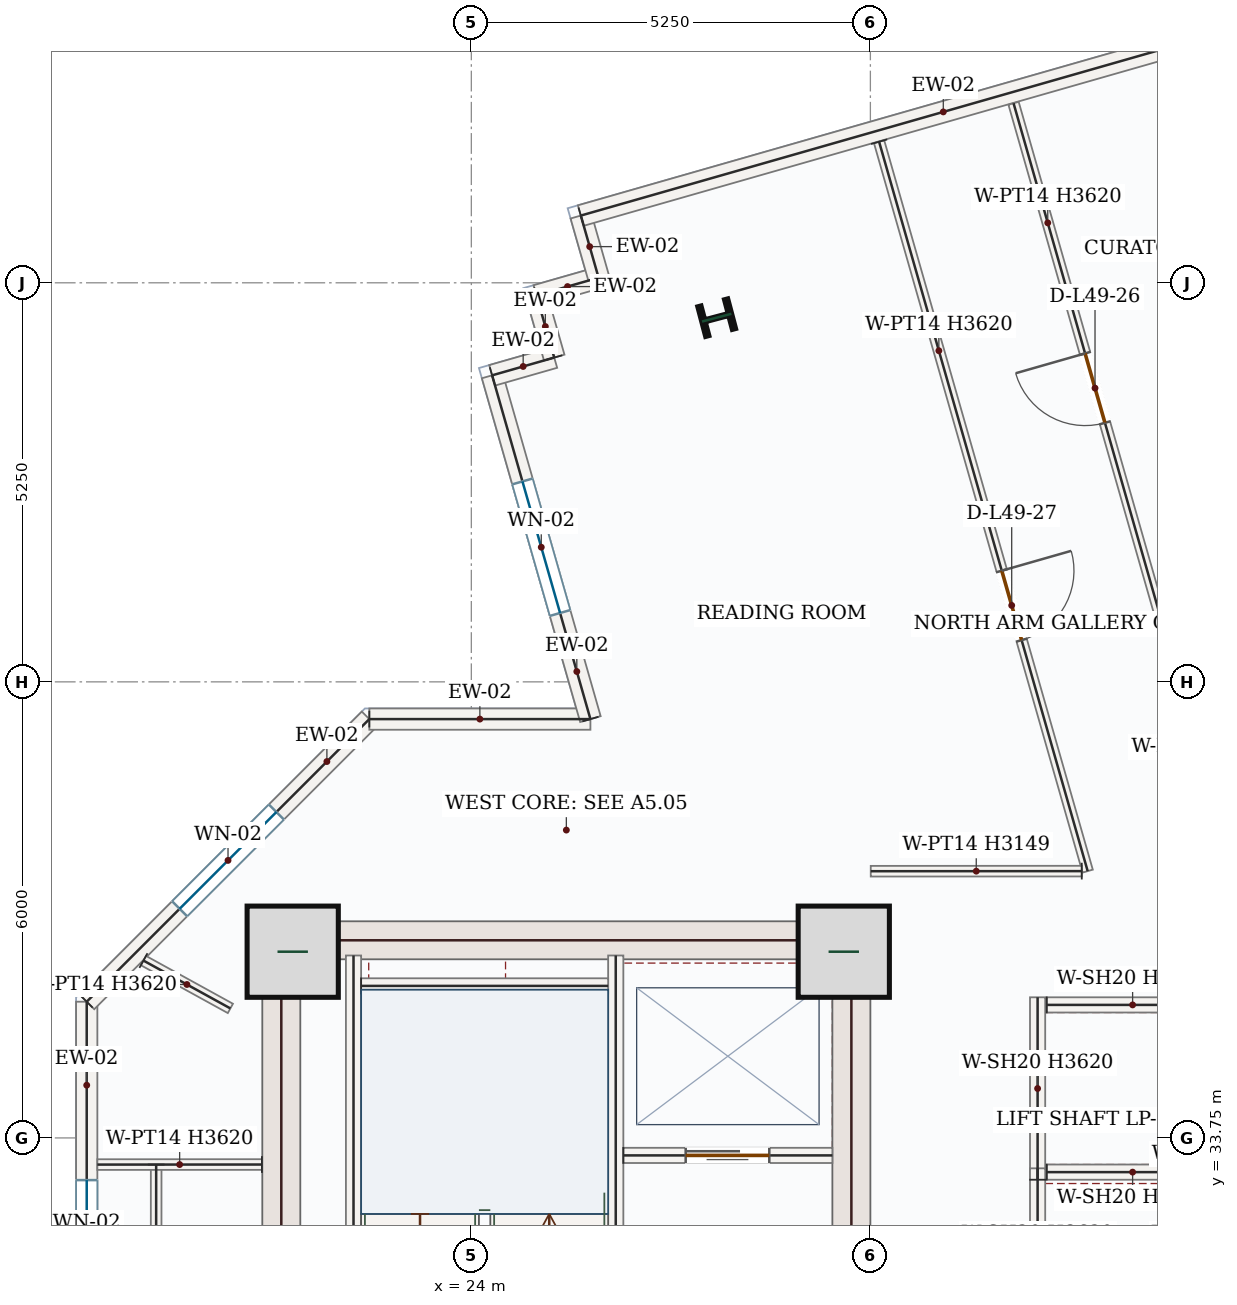
"""IFC4 building model, lengths in metres.
Left out: names, types, materials, properties, quantities, classifications, styles, units other than length and angle.
Written with IfcOpenShell. Run it as: python <this file> out.ifc"""

import sys

from ifc_helpers import new_model, si_unit, direction, frame, frame_2d, origin, origin_2d, place, context, subcontext, project, spatial, rectangle, i_section, extrude, source, transform, mapped, element, fill, save


model = new_model("IFC4")
c1 = context("Model", 3, precision=1e-05, world=origin(), true_north=direction((0.0, 1.0)))
c2 = subcontext(c1, "Body", "Model", "MODEL_VIEW")
j1 = project(units=[si_unit("LENGTHUNIT", "METRE"), si_unit("PLANEANGLEUNIT", "RADIAN")], contexts=[c1])
p1 = place(None, origin())
s1 = spatial("IfcSite", under=j1, at=p1, CompositionType="ELEMENT")
p2 = place(p1, origin())
s2 = spatial("IfcBuilding", under=s1, at=p2, CompositionType="ELEMENT")
p3 = place(p2, frame((0.0, 0.0, 209.7)))
s3 = spatial("IfcBuildingStorey", under=s2, at=p3, CompositionType="ELEMENT", Elevation=209.7)
m1 = source(origin(), c2, "Body", "SweptSolid", [
    extrude(rectangle(XDim=8.55, YDim=0.5, at=frame_2d((4.275, 0.0))), origin(), (0.0, 0.0, 1.0), 3.62),
])
p4 = place(p3, frame((21.5, 28.05, 0.0), z_axis=(0.0, 0.0, 1.0), x_axis=(0.0, 1.0, 0.0)))
e1 = element("IfcWall", 1, at=p4, inside=s3, PredefinedType="SHEAR", context=c2, shape_type="MappedRepresentation", body=[
    mapped(m1, transform((0.0, 0.0, 0.0), x_axis=(1.0, 0.0, 0.0), y_axis=(0.0, 1.0, 0.0), z_axis=(0.0, 0.0, 1.0), scale=1.0)),
])
p5 = place(p3, frame((29.0, 28.05, 0.0), z_axis=(0.0, 0.0, 1.0), x_axis=(0.0, 1.0, 0.0)))
e2 = element("IfcWall", 2, at=p5, inside=s3, PredefinedType="SHEAR", context=c2, shape_type="SweptSolid", body=[
    extrude(rectangle(XDim=8.55, YDim=0.5, at=frame_2d((4.275, 0.0))), origin(), (0.0, 0.0, 1.0), 3.62),
])
p6 = place(p5, frame((1.5, 0.0, 0.0)))
e3 = element("IfcOpeningElement", 3, at=p6, cuts=e2, PredefinedType="OPENING", context=c2, shape_type="SweptSolid", body=[
    extrude(rectangle(XDim=1.1, YDim=2.2, at=frame_2d((0.55, 1.1))), frame((0.0, 0.26, 0.0), z_axis=(0.0, -1.0, 0.0), x_axis=(1.0, 0.0, 0.0)), (0.0, 0.0, 1.0), 0.52),
])
m2 = source(origin(), c2, "Body", "SweptSolid", [
    extrude(rectangle(XDim=7.0, YDim=0.5, at=frame_2d((3.5, 0.0))), origin(), (0.0, 0.0, 1.0), 3.62),
])
p7 = place(p3, frame((21.75, 36.35, 0.0), z_axis=(0.0, 0.0, 1.0), x_axis=(1.0, 0.0, 0.0)))
e4 = element("IfcWall", 4, at=p7, inside=s3, PredefinedType="SHEAR", context=c2, shape_type="MappedRepresentation", body=[
    mapped(m2, transform((0.0, 0.0, 0.0), x_axis=(1.0, 0.0, 0.0), y_axis=(0.0, 1.0, 0.0), z_axis=(0.0, 0.0, 1.0), scale=1.0)),
])
m3 = source(origin(), c2, "Body", "SweptSolid", [
    extrude(rectangle(XDim=1.2, YDim=1.2, at=origin_2d()), origin(), (0.0, 0.0, 1.0), 3.9),
])
for number, where, z_axis, x_axis in (
    (5, (21.65, 36.2, 0.0), (0.0, 0.0, 1.0), (1.0, 0.0, 0.0)),
    (6, (28.9, 36.2, 0.0), (0.0, 0.0, 1.0), (1.0, 0.0, 0.0)),
):
    element("IfcColumn", number, at=place(p3, frame(where, z_axis=z_axis, x_axis=x_axis)), inside=s3, PredefinedType="COLUMN", context=c2, shape_type="MappedRepresentation", body=[
        mapped(m3, transform((0.0, 0.0, 0.0), x_axis=(1.0, 0.0, 0.0), y_axis=(0.0, 1.0, 0.0), z_axis=(0.0, 0.0, 1.0), scale=1.0)),
    ])
m4 = source(origin(), c2, "Body", "SweptSolid", [
    extrude(i_section(OverallWidth=0.404, OverallDepth=0.407, WebThickness=0.027, FlangeThickness=0.044, FilletRadius=0.018, at=origin_2d()), origin(), (0.0, 0.0, 1.0), 3.9),
])
p8 = place(p3, frame((27.228, 44.541, 0.0), z_axis=(0.0, 0.0, 1.0), x_axis=(-0.255445757936, 0.966823388604, 0.0)))
e7 = element("IfcColumn", 7, at=p8, inside=s3, PredefinedType="COLUMN", context=c2, shape_type="MappedRepresentation", body=[
    mapped(m4, transform((0.0, 0.0, 0.0), x_axis=(1.0, 0.0, 0.0), y_axis=(0.0, 1.0, 0.0), z_axis=(0.0, 0.0, 1.0), scale=1.0)),
])
p9 = place(p3, frame((18.94, 29.048, 0.0), z_axis=(0.0, 0.0, 1.0), x_axis=(0.0, 1.0, 0.0)))
e8 = element("IfcWall", 8, at=p9, inside=s3, PredefinedType="SOLIDWALL", context=c2, shape_type="SweptSolid", body=[
    extrude(rectangle(XDim=6.494, YDim=0.28, at=frame_2d((3.247, 0.0))), origin(), (0.0, 0.0, 1.0), 3.62),
])
p10 = place(p9, frame((2.347, 0.0, 0.85)))
e9 = element("IfcOpeningElement", 9, at=p10, cuts=e8, PredefinedType="OPENING", context=c2, shape_type="SweptSolid", body=[
    extrude(rectangle(XDim=1.8, YDim=1.75, at=frame_2d((0.9, 0.875))), frame((0.0, 0.15, 0.0), z_axis=(0.0, -1.0, 0.0), x_axis=(1.0, 0.0, 0.0)), (0.0, 0.0, 1.0), 0.3),
])
p11 = place(p3, frame((18.94, 35.542, 0.0), z_axis=(0.0, 0.0, 1.0), x_axis=(0.707106781187, 0.707106781187, 0.0)))
e10 = element("IfcWall", 10, at=p11, inside=s3, PredefinedType="SOLIDWALL", context=c2, shape_type="SweptSolid", body=[
    extrude(rectangle(XDim=5.258, YDim=0.28, at=frame_2d((2.629, 0.0))), origin(), (0.0, 0.0, 1.0), 3.62),
])
p12 = place(p11, frame((1.729, 0.0, 0.85)))
e11 = element("IfcOpeningElement", 11, at=p12, cuts=e10, PredefinedType="OPENING", context=c2, shape_type="SweptSolid", body=[
    extrude(rectangle(XDim=1.8, YDim=1.75, at=frame_2d((0.9, 0.875))), frame((0.0, 0.15, 0.0), z_axis=(0.0, -1.0, 0.0), x_axis=(1.0, 0.0, 0.0)), (0.0, 0.0, 1.0), 0.3),
])
m5 = source(origin(), c2, "Body", "SweptSolid", [
    extrude(rectangle(XDim=2.909, YDim=0.28, at=frame_2d((1.455, 0.0))), origin(), (0.0, 0.0, 1.0), 3.62),
])
p13 = place(p3, frame((22.658, 39.26, 0.0), z_axis=(0.0, 0.0, 1.0), x_axis=(1.0, 0.0, 0.0)))
e12 = element("IfcWall", 12, at=p13, inside=s3, PredefinedType="SOLIDWALL", context=c2, shape_type="MappedRepresentation", body=[
    mapped(m5, transform((0.0, 0.0, 0.0), x_axis=(1.0, 0.0, 0.0), y_axis=(0.0, 1.0, 0.0), z_axis=(0.0, 0.0, 1.0), scale=1.0)),
])
p14 = place(p3, frame((25.567, 39.26, 0.0), z_axis=(0.0, 0.0, 1.0), x_axis=(-0.274981611661, 0.961449485542, 0.0)))
e13 = element("IfcWall", 13, at=p14, inside=s3, PredefinedType="SOLIDWALL", context=c2, shape_type="SweptSolid", body=[
    extrude(rectangle(XDim=4.704, YDim=0.28, at=frame_2d((2.352, 0.0))), origin(), (0.0, 0.0, 1.0), 3.62),
])
p15 = place(p14, frame((1.452, 0.0, 0.85)))
e14 = element("IfcOpeningElement", 14, at=p15, cuts=e13, PredefinedType="OPENING", context=c2, shape_type="SweptSolid", body=[
    extrude(rectangle(XDim=1.8, YDim=1.75, at=frame_2d((0.9, 0.875))), frame((0.0, 0.15, 0.0), z_axis=(0.0, -1.0, 0.0), x_axis=(1.0, 0.0, 0.0)), (0.0, 0.0, 1.0), 0.3),
])
m6 = source(origin(), c2, "Body", "SweptSolid", [
    extrude(rectangle(XDim=0.85, YDim=0.28, at=frame_2d((0.425, 0.0))), origin(), (0.0, 0.0, 1.0), 3.62),
])
p16 = place(p3, frame((24.273, 43.782, 0.0), z_axis=(0.0, 0.0, 1.0), x_axis=(0.961469728335, 0.274910824624, 0.0)))
e15 = element("IfcWall", 15, at=p16, inside=s3, PredefinedType="SOLIDWALL", context=c2, shape_type="MappedRepresentation", body=[
    mapped(m6, transform((0.0, 0.0, 0.0), x_axis=(1.0, 0.0, 0.0), y_axis=(0.0, 1.0, 0.0), z_axis=(0.0, 0.0, 1.0), scale=1.0)),
])
m7 = source(origin(), c2, "Body", "SweptSolid", [
    extrude(rectangle(XDim=0.85, YDim=0.28, at=frame_2d((0.425, 0.0))), origin(), (0.0, 0.0, 1.0), 3.62),
])
p17 = place(p3, frame((25.091, 44.016, 0.0), z_axis=(0.0, 0.0, 1.0), x_axis=(-0.274834915789, 0.961491429532, 0.0)))
e16 = element("IfcWall", 16, at=p17, inside=s3, PredefinedType="SOLIDWALL", context=c2, shape_type="MappedRepresentation", body=[
    mapped(m7, transform((0.0, 0.0, 0.0), x_axis=(1.0, 0.0, 0.0), y_axis=(0.0, 1.0, 0.0), z_axis=(0.0, 0.0, 1.0), scale=1.0)),
])
p18 = place(p3, frame((24.857, 44.833, 0.0), z_axis=(0.0, 0.0, 1.0), x_axis=(0.961469728335, 0.274910824624, 0.0)))
e17 = element("IfcWall", 17, at=p18, inside=s3, PredefinedType="SOLIDWALL", context=c2, shape_type="MappedRepresentation", body=[
    mapped(m6, transform((0.0, 0.0, 0.0), x_axis=(1.0, 0.0, 0.0), y_axis=(0.0, 1.0, 0.0), z_axis=(0.0, 0.0, 1.0), scale=1.0)),
])
p19 = place(p3, frame((25.674, 45.067, 0.0), z_axis=(0.0, 0.0, 1.0), x_axis=(-0.274834915789, 0.961491429532, 0.0)))
e18 = element("IfcWall", 18, at=p19, inside=s3, PredefinedType="SOLIDWALL", context=c2, shape_type="MappedRepresentation", body=[
    mapped(m7, transform((0.0, 0.0, 0.0), x_axis=(1.0, 0.0, 0.0), y_axis=(0.0, 1.0, 0.0), z_axis=(0.0, 0.0, 1.0), scale=1.0)),
])
m8 = source(origin(), c2, "Body", "SweptSolid", [
    extrude(rectangle(XDim=9.92, YDim=0.28, at=frame_2d((4.96, 0.0))), origin(), (0.0, 0.0, 1.0), 3.62),
])
p20 = place(p3, frame((25.44, 45.885, 0.0), z_axis=(0.0, 0.0, 1.0), x_axis=(0.961457051276, 0.274955157346, 0.0)))
e19 = element("IfcWall", 19, at=p20, inside=s3, PredefinedType="SOLIDWALL", context=c2, shape_type="MappedRepresentation", body=[
    mapped(m8, transform((0.0, 0.0, 0.0), x_axis=(1.0, 0.0, 0.0), y_axis=(0.0, 1.0, 0.0), z_axis=(0.0, 0.0, 1.0), scale=1.0)),
])
m9 = source(origin(), c2, "Body", "SweptSolid", [
    extrude(rectangle(XDim=7.87, YDim=0.2, at=frame_2d((3.935, 0.0))), origin(), (0.0, 0.0, 1.0), 3.62),
])
p21 = place(p3, frame((22.45, 28.28, 0.0), z_axis=(0.0, 0.0, 1.0), x_axis=(0.0, 1.0, 0.0)))
e20 = element("IfcWall", 20, at=p21, inside=s3, PredefinedType="SOLIDWALL", context=c2, shape_type="MappedRepresentation", body=[
    mapped(m9, transform((0.0, 0.0, 0.0), x_axis=(1.0, 0.0, 0.0), y_axis=(0.0, 1.0, 0.0), z_axis=(0.0, 0.0, 1.0), scale=1.0)),
])
p22 = place(p3, frame((25.9, 28.15, 0.0), z_axis=(0.0, 0.0, 1.0), x_axis=(0.0, 1.0, 0.0)))
e21 = element("IfcWall", 21, at=p22, inside=s3, PredefinedType="SOLIDWALL", context=c2, shape_type="SweptSolid", body=[
    extrude(rectangle(XDim=8.0, YDim=0.2, at=frame_2d((4.0, 0.0))), origin(), (0.0, 0.0, 1.0), 3.62),
])
p23 = place(p22, frame((0.4, 0.0, 0.0)))
e22 = element("IfcOpeningElement", 22, at=p23, cuts=e21, PredefinedType="OPENING", context=c2, shape_type="SweptSolid", body=[
    extrude(rectangle(XDim=1.05, YDim=2.15, at=frame_2d((0.525, 1.075))), frame((0.0, 0.11, 0.0), z_axis=(0.0, -1.0, 0.0), x_axis=(1.0, 0.0, 0.0)), (0.0, 0.0, 1.0), 0.22),
])
m10 = source(origin(), c2, "Body", "SweptSolid", [
    extrude(rectangle(XDim=3.25, YDim=0.2, at=frame_2d((1.625, 0.0))), origin(), (0.0, 0.0, 1.0), 3.62),
])
p24 = place(p3, frame((22.55, 35.75, 0.0), z_axis=(0.0, 0.0, 1.0), x_axis=(1.0, 0.0, 0.0)))
e23 = element("IfcWall", 23, at=p24, inside=s3, PredefinedType="SOLIDWALL", context=c2, shape_type="MappedRepresentation", body=[
    mapped(m10, transform((0.0, 0.0, 0.0), x_axis=(1.0, 0.0, 0.0), y_axis=(0.0, 1.0, 0.0), z_axis=(0.0, 0.0, 1.0), scale=1.0)),
])
p25 = place(p3, frame((26.0, 33.52, 0.0), z_axis=(0.0, 0.0, 1.0), x_axis=(1.0, 0.0, 0.0)))
e24 = element("IfcWall", 24, at=p25, inside=s3, PredefinedType="SOLIDWALL", context=c2, shape_type="SweptSolid", body=[
    extrude(rectangle(XDim=2.75, YDim=0.2, at=frame_2d((1.375, 0.0))), origin(), (0.0, 0.0, 1.0), 3.62),
])
p26 = place(p25, frame((0.82, 0.0, 0.0)))
e25 = element("IfcOpeningElement", 25, at=p26, cuts=e24, PredefinedType="OPENING", context=c2, shape_type="SweptSolid", body=[
    extrude(rectangle(XDim=1.1, YDim=2.15, at=frame_2d((0.55, 1.075))), frame((0.0, 0.11, 0.0), z_axis=(0.0, -1.0, 0.0), x_axis=(1.0, 0.0, 0.0)), (0.0, 0.0, 1.0), 0.22),
])
m11 = source(origin(), c2, "Body", "SweptSolid", [
    extrude(rectangle(XDim=2.4, YDim=0.2, at=frame_2d((1.2, 0.0))), origin(), (0.0, 0.0, 1.0), 3.62),
])
p27 = place(p3, frame((31.45, 33.2, 0.0), z_axis=(0.0, 0.0, 1.0), x_axis=(0.0, 1.0, 0.0)))
e26 = element("IfcWall", 26, at=p27, inside=s3, PredefinedType="SOLIDWALL", context=c2, shape_type="MappedRepresentation", body=[
    mapped(m11, transform((0.0, 0.0, 0.0), x_axis=(1.0, 0.0, 0.0), y_axis=(0.0, 1.0, 0.0), z_axis=(0.0, 0.0, 1.0), scale=1.0)),
])
m12 = source(origin(), c2, "Body", "SweptSolid", [
    extrude(rectangle(XDim=2.26, YDim=0.2, at=frame_2d((1.13, 0.0))), origin(), (0.0, 0.0, 1.0), 3.62),
])
for number, where, z_axis, x_axis in (
    (27, (31.57, 33.3, 0.0), (0.0, 0.0, 1.0), (1.0, 0.0, 0.0)),
    (28, (31.57, 35.5, 0.0), (0.0, 0.0, 1.0), (1.0, 0.0, 0.0)),
):
    element("IfcWall", number, at=place(p3, frame(where, z_axis=z_axis, x_axis=x_axis)), inside=s3, PredefinedType="SOLIDWALL", context=c2, shape_type="MappedRepresentation", body=[
        mapped(m12, transform((0.0, 0.0, 0.0), x_axis=(1.0, 0.0, 0.0), y_axis=(0.0, 1.0, 0.0), z_axis=(0.0, 0.0, 1.0), scale=1.0)),
    ])
p28 = place(p3, frame((31.45, 30.95, 0.0), z_axis=(0.0, 0.0, 1.0), x_axis=(0.0, 1.0, 0.0)))
e29 = element("IfcWall", 29, at=p28, inside=s3, PredefinedType="SOLIDWALL", context=c2, shape_type="MappedRepresentation", body=[
    mapped(m11, transform((0.0, 0.0, 0.0), x_axis=(1.0, 0.0, 0.0), y_axis=(0.0, 1.0, 0.0), z_axis=(0.0, 0.0, 1.0), scale=1.0)),
])
p29 = place(p3, frame((33.277, 39.867, 0.0), z_axis=(0.0, 0.0, 1.0), x_axis=(-0.274985856522, 0.96144827147, 0.0)))
e30 = element("IfcWall", 30, at=p29, inside=s3, PredefinedType="PARTITIONING", context=c2, shape_type="SweptSolid", body=[
    extrude(rectangle(XDim=7.795, YDim=0.14, at=frame_2d((3.897, 0.0))), origin(), (0.0, 0.0, 1.0), 3.62),
])
p30 = place(p29, frame((3.423, 0.0, 0.0)))
e31 = element("IfcOpeningElement", 31, at=p30, cuts=e30, PredefinedType="OPENING", context=c2, shape_type="SweptSolid", body=[
    extrude(rectangle(XDim=0.95, YDim=2.15, at=frame_2d((0.475, 1.075))), frame((0.0, 0.08, 0.0), z_axis=(0.0, -1.0, 0.0), x_axis=(1.0, 0.0, 0.0)), (0.0, 0.0, 1.0), 0.16),
])
m13 = source(origin(), c2, "Body", "SweptSolid", [
    extrude(rectangle(XDim=10.061, YDim=0.14, at=frame_2d((5.031, 0.0))), origin(), (0.0, 0.0, 1.0), 2.766),
])
p31 = place(p3, frame((19.854, 33.399, 0.0), z_axis=(0.0, 0.0, 1.0), x_axis=(-0.000363980467, -0.999999933759, 0.0)))
e32 = element("IfcWall", 32, at=p31, inside=s3, PredefinedType="PARTITIONING", context=c2, shape_type="MappedRepresentation", body=[
    mapped(m13, transform((0.0, 0.0, 0.0), x_axis=(1.0, 0.0, 0.0), y_axis=(0.0, 1.0, 0.0), z_axis=(0.0, 0.0, 1.0), scale=1.0)),
])
m14 = source(origin(), c2, "Body", "SweptSolid", [
    extrude(rectangle(XDim=1.305, YDim=0.14, at=frame_2d((0.653, 0.0))), origin(), (0.0, 0.0, 1.0), 3.62),
])
p32 = place(p3, frame((19.686, 36.083, 0.0), z_axis=(0.0, 0.0, 1.0), x_axis=(0.876117183384, -0.48209820678, 0.0)))
e33 = element("IfcWall", 33, at=p32, inside=s3, PredefinedType="PARTITIONING", context=c2, shape_type="MappedRepresentation", body=[
    mapped(m14, transform((0.0, 0.0, 0.0), x_axis=(1.0, 0.0, 0.0), y_axis=(0.0, 1.0, 0.0), z_axis=(0.0, 0.0, 1.0), scale=1.0)),
])
m15 = source(origin(), c2, "Body", "SweptSolid", [
    extrude(rectangle(XDim=2.165, YDim=0.14, at=frame_2d((1.083, 0.0))), origin(), (0.0, 0.0, 1.0), 3.62),
])
p33 = place(p3, frame((21.245, 33.4, 0.0), z_axis=(0.0, 0.0, 1.0), x_axis=(-0.999999942778, -0.000338294974, 0.0)))
e34 = element("IfcWall", 34, at=p33, inside=s3, PredefinedType="PARTITIONING", context=c2, shape_type="MappedRepresentation", body=[
    mapped(m15, transform((0.0, 0.0, 0.0), x_axis=(1.0, 0.0, 0.0), y_axis=(0.0, 1.0, 0.0), z_axis=(0.0, 0.0, 1.0), scale=1.0)),
])
p34 = place(p3, frame((29.365, 46.856, 0.0), z_axis=(0.0, 0.0, 1.0), x_axis=(0.274969885882, -0.961452839123, 0.0)))
e35 = element("IfcWall", 35, at=p34, inside=s3, PredefinedType="PARTITIONING", context=c2, shape_type="SweptSolid", body=[
    extrude(rectangle(XDim=9.981, YDim=0.14, at=frame_2d((4.99, 0.0))), origin(), (0.0, 0.0, 1.0), 3.62),
])
p35 = place(p34, frame((5.87, 0.0, 0.0)))
e36 = element("IfcOpeningElement", 36, at=p35, cuts=e35, PredefinedType="OPENING", context=c2, shape_type="SweptSolid", body=[
    extrude(rectangle(XDim=0.95, YDim=2.15, at=frame_2d((0.475, 1.075))), frame((0.0, 0.08, 0.0), z_axis=(0.0, -1.0, 0.0), x_axis=(1.0, 0.0, 0.0)), (0.0, 0.0, 1.0), 0.16),
])
m16 = source(origin(), c2, "Body", "SweptSolid", [
    extrude(rectangle(XDim=2.776, YDim=0.14, at=frame_2d((1.388, 0.0))), origin(), (0.0, 0.0, 1.0), 3.149),
])
p36 = place(p3, frame((32.031, 37.26, 0.0), z_axis=(0.0, 0.0, 1.0), x_axis=(-0.999999903325, -0.000439715022, 0.0)))
e37 = element("IfcWall", 37, at=p36, inside=s3, PredefinedType="PARTITIONING", context=c2, shape_type="MappedRepresentation", body=[
    mapped(m16, transform((0.0, 0.0, 0.0), x_axis=(1.0, 0.0, 0.0), y_axis=(0.0, 1.0, 0.0), z_axis=(0.0, 0.0, 1.0), scale=1.0)),
])
m17 = source(origin(), c2, "Body", "SweptSolid", [
    extrude(rectangle(XDim=1.8, YDim=1.75, at=frame_2d((0.9, 0.875))), frame((0.0, 0.03, 0.0), z_axis=(0.0, -1.0, 0.0), x_axis=(1.0, 0.0, 0.0)), (0.0, 0.0, 1.0), 0.06),
])
p37 = place(p10, origin())
e38 = element("IfcWindow", 38, at=p37, inside=s3, PartitioningType="DOUBLE_PANEL_VERTICAL", PredefinedType="WINDOW", context=c2, shape_type="MappedRepresentation", body=[
    mapped(m17, transform((0.0, 0.0, 0.0), x_axis=(1.0, 0.0, 0.0), y_axis=(0.0, 1.0, 0.0), z_axis=(0.0, 0.0, 1.0), scale=1.0)),
])
fill(e9, e38)
p38 = place(p12, origin())
e39 = element("IfcWindow", 39, at=p38, inside=s3, PartitioningType="DOUBLE_PANEL_VERTICAL", PredefinedType="WINDOW", context=c2, shape_type="MappedRepresentation", body=[
    mapped(m17, transform((0.0, 0.0, 0.0), x_axis=(1.0, 0.0, 0.0), y_axis=(0.0, 1.0, 0.0), z_axis=(0.0, 0.0, 1.0), scale=1.0)),
])
fill(e11, e39)
p39 = place(p15, origin())
e40 = element("IfcWindow", 40, at=p39, inside=s3, PartitioningType="DOUBLE_PANEL_VERTICAL", PredefinedType="WINDOW", context=c2, shape_type="MappedRepresentation", body=[
    mapped(m17, transform((0.0, 0.0, 0.0), x_axis=(1.0, 0.0, 0.0), y_axis=(0.0, 1.0, 0.0), z_axis=(0.0, 0.0, 1.0), scale=1.0)),
])
fill(e14, e40)
m18 = source(origin(), c2, "Body", "SweptSolid", [
    extrude(rectangle(XDim=1.1, YDim=2.15, at=frame_2d((0.55, 1.075))), frame((0.0, 0.025, 0.0), z_axis=(0.0, -1.0, 0.0), x_axis=(1.0, 0.0, 0.0)), (0.0, 0.0, 1.0), 0.05),
])
p40 = place(p26, origin())
e41 = element("IfcDoor", 41, at=p40, inside=s3, OperationType="DOUBLE_DOOR_SLIDING", PredefinedType="DOOR", context=c2, shape_type="MappedRepresentation", body=[
    mapped(m18, transform((0.0, 0.0, 0.0), x_axis=(1.0, 0.0, 0.0), y_axis=(0.0, 1.0, 0.0), z_axis=(0.0, 0.0, 1.0), scale=1.0)),
])
fill(e25, e41)
m19 = source(origin(), c2, "Body", "SweptSolid", [
    extrude(rectangle(XDim=0.95, YDim=2.15, at=frame_2d((0.475, 1.075))), frame((0.0, 0.025, 0.0), z_axis=(0.0, -1.0, 0.0), x_axis=(1.0, 0.0, 0.0)), (0.0, 0.0, 1.0), 0.05),
])
p41 = place(p30, origin())
e42 = element("IfcDoor", 42, at=p41, inside=s3, OperationType="SINGLE_SWING_RIGHT", PredefinedType="DOOR", context=c2, shape_type="MappedRepresentation", body=[
    mapped(m19, transform((0.0, 0.0, 0.0), x_axis=(1.0, 0.0, 0.0), y_axis=(0.0, 1.0, 0.0), z_axis=(0.0, 0.0, 1.0), scale=1.0)),
])
fill(e31, e42)
p42 = place(p35, origin())
e43 = element("IfcDoor", 43, at=p42, inside=s3, OperationType="SINGLE_SWING_LEFT", PredefinedType="DOOR", context=c2, shape_type="MappedRepresentation", body=[
    mapped(m19, transform((0.0, 0.0, 0.0), x_axis=(1.0, 0.0, 0.0), y_axis=(0.0, 1.0, 0.0), z_axis=(0.0, 0.0, 1.0), scale=1.0)),
])
fill(e36, e43)
save(model, sys.argv[1])
